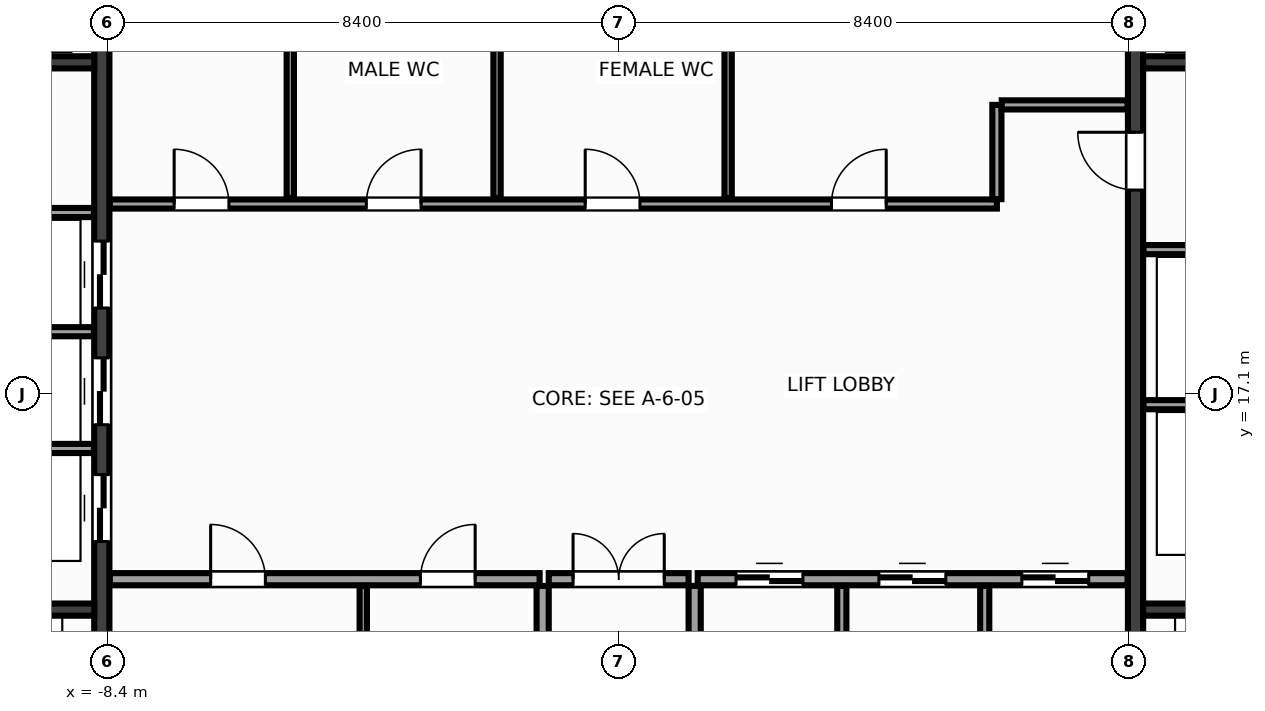
"""IFC4 building model, lengths in metres.
Left out: names, types, materials, properties, quantities, classifications, styles, units other than length and angle.
Written with IfcOpenShell. Run it as: python <this file> out.ifc"""

import sys

from ifc_helpers import new_model, si_unit, direction, frame, frame_2d, origin, place, context, subcontext, project, spatial, rectangle, extrude, source, transform, mapped, element, fill, save


model = new_model("IFC4")
c1 = context("Model", 3, precision=1e-05, world=origin(), true_north=direction((0.0, 1.0)))
c2 = subcontext(c1, "Body", "Model", "MODEL_VIEW")
j1 = project(units=[si_unit("LENGTHUNIT", "METRE"), si_unit("PLANEANGLEUNIT", "RADIAN")], contexts=[c1])
p1 = place(None, origin())
s1 = spatial("IfcSite", under=j1, at=p1, CompositionType="ELEMENT")
p2 = place(p1, origin())
s2 = spatial("IfcBuilding", under=s1, at=p2, CompositionType="ELEMENT")
p3 = place(p2, frame((0.0, 0.0, 164.0)))
s3 = spatial("IfcBuildingStorey", under=s2, at=p3, CompositionType="ELEMENT", Elevation=164.0)
m1 = source(origin(), c2, "Body", "SweptSolid", [
    extrude(rectangle(XDim=12.95, YDim=0.25, at=frame_2d((6.475, 0.0))), origin(), (0.0, 0.0, 1.0), 3.6),
])
p4 = place(p3, frame((-8.5, 10.525, 0.0), z_axis=(0.0, 0.0, 1.0), x_axis=(0.0, 1.0, 0.0)))
e1 = element("IfcWall", 1, at=p4, inside=s3, PredefinedType="SHEAR", context=c2, shape_type="MappedRepresentation", body=[
    mapped(m1, transform((0.0, 0.0, 0.0), x_axis=(1.0, 0.0, 0.0), y_axis=(0.0, 1.0, 0.0), z_axis=(0.0, 0.0, 1.0), scale=1.0)),
])
p5 = place(p4, frame((4.145, 0.0, 0.0)))
e2 = element("IfcOpeningElement", 2, at=p5, cuts=e1, PredefinedType="OPENING", context=c2, shape_type="SweptSolid", body=[
    extrude(rectangle(XDim=1.1, YDim=2.15, at=frame_2d((0.55, 1.075))), frame((0.0, 0.137, 0.0), z_axis=(0.0, -1.0, 0.0), x_axis=(1.0, 0.0, 0.0)), (0.0, 0.0, 1.0), 0.274),
])
p6 = place(p4, frame((6.065, 0.0, 0.0)))
e3 = element("IfcOpeningElement", 3, at=p6, cuts=e1, PredefinedType="OPENING", context=c2, shape_type="SweptSolid", body=[
    extrude(rectangle(XDim=1.1, YDim=2.15, at=frame_2d((0.55, 1.075))), frame((0.0, 0.137, 0.0), z_axis=(0.0, -1.0, 0.0), x_axis=(1.0, 0.0, 0.0)), (0.0, 0.0, 1.0), 0.274),
])
p7 = place(p4, frame((7.985, 0.0, 0.0)))
e4 = element("IfcOpeningElement", 4, at=p7, cuts=e1, PredefinedType="OPENING", context=c2, shape_type="SweptSolid", body=[
    extrude(rectangle(XDim=1.1, YDim=2.15, at=frame_2d((0.55, 1.075))), frame((0.0, 0.137, 0.0), z_axis=(0.0, -1.0, 0.0), x_axis=(1.0, 0.0, 0.0)), (0.0, 0.0, 1.0), 0.274),
])
p8 = place(p3, frame((8.5, 10.525, 0.0), z_axis=(0.0, 0.0, 1.0), x_axis=(0.0, 1.0, 0.0)))
e5 = element("IfcWall", 5, at=p8, inside=s3, PredefinedType="SHEAR", context=c2, shape_type="MappedRepresentation", body=[
    mapped(m1, transform((0.0, 0.0, 0.0), x_axis=(1.0, 0.0, 0.0), y_axis=(0.0, 1.0, 0.0), z_axis=(0.0, 0.0, 1.0), scale=1.0)),
])
p9 = place(p8, frame((9.925, 0.0, 0.0)))
e6 = element("IfcOpeningElement", 6, at=p9, cuts=e5, PredefinedType="OPENING", context=c2, shape_type="SweptSolid", body=[
    extrude(rectangle(XDim=0.95, YDim=2.15, at=frame_2d((0.475, 1.075))), frame((0.0, 0.137, 0.0), z_axis=(0.0, -1.0, 0.0), x_axis=(1.0, 0.0, 0.0)), (0.0, 0.0, 1.0), 0.274),
])
m2 = source(origin(), c2, "Body", "SweptSolid", [
    extrude(rectangle(XDim=2.825, YDim=0.2, at=frame_2d((1.413, 0.0))), origin(), (0.0, 0.0, 1.0), 3.6),
])
for number, where, z_axis, x_axis in (
    (7, (-11.45, 13.55, 0.0), (0.0, 0.0, 1.0), (1.0, 0.0, 0.0)),
    (8, (8.625, 13.55, 0.0), (0.0, 0.0, 1.0), (1.0, 0.0, 0.0)),
):
    element("IfcWall", number, at=place(p3, frame(where, z_axis=z_axis, x_axis=x_axis)), inside=s3, PredefinedType="SHEAR", context=c2, shape_type="MappedRepresentation", body=[
        mapped(m2, transform((0.0, 0.0, 0.0), x_axis=(1.0, 0.0, 0.0), y_axis=(0.0, 1.0, 0.0), z_axis=(0.0, 0.0, 1.0), scale=1.0)),
    ])
m3 = source(origin(), c2, "Body", "SweptSolid", [
    extrude(rectangle(XDim=3.02, YDim=0.2, at=frame_2d((1.51, 0.0))), origin(), (0.0, 0.0, 1.0), 3.6),
])
for number, where, z_axis, x_axis in (
    (9, (-11.645, 22.55, 0.0), (0.0, 0.0, 1.0), (1.0, 0.0, 0.0)),
    (10, (8.625, 22.55, 0.0), (0.0, 0.0, 1.0), (1.0, 0.0, 0.0)),
):
    element("IfcWall", number, at=place(p3, frame(where, z_axis=z_axis, x_axis=x_axis)), inside=s3, PredefinedType="SHEAR", context=c2, shape_type="MappedRepresentation", body=[
        mapped(m3, transform((0.0, 0.0, 0.0), x_axis=(1.0, 0.0, 0.0), y_axis=(0.0, 1.0, 0.0), z_axis=(0.0, 0.0, 1.0), scale=1.0)),
    ])
m4 = source(origin(), c2, "Body", "SweptSolid", [
    extrude(rectangle(XDim=3.01, YDim=0.15, at=frame_2d((1.505, 0.0))), origin(), (0.0, 0.0, 1.0), 3.38),
])
for number, where, z_axis, x_axis in (
    (11, (-11.64, 16.2, 0.0), (0.0, 0.0, 1.0), (1.0, 0.0, 0.0)),
    (12, (-11.64, 18.12, 0.0), (0.0, 0.0, 1.0), (1.0, 0.0, 0.0)),
    (13, (-11.64, 20.08, 0.0), (0.0, 0.0, 1.0), (1.0, 0.0, 0.0)),
    (14, (8.63, 16.92, 0.0), (0.0, 0.0, 1.0), (1.0, 0.0, 0.0)),
    (15, (8.63, 19.47, 0.0), (0.0, 0.0, 1.0), (1.0, 0.0, 0.0)),
):
    element("IfcWall", number, at=place(p3, frame(where, z_axis=z_axis, x_axis=x_axis)), inside=s3, PredefinedType="PARTITIONING", context=c2, shape_type="MappedRepresentation", body=[
        mapped(m4, transform((0.0, 0.0, 0.0), x_axis=(1.0, 0.0, 0.0), y_axis=(0.0, 1.0, 0.0), z_axis=(0.0, 0.0, 1.0), scale=1.0)),
    ])
m5 = source(origin(), c2, "Body", "SweptSolid", [
    extrude(rectangle(XDim=7.07, YDim=0.2, at=frame_2d((3.535, 0.0))), origin(), (0.0, 0.0, 1.0), 3.38),
])
p10 = place(p3, frame((-8.37, 14.05, 0.0), z_axis=(0.0, 0.0, 1.0), x_axis=(1.0, 0.0, 0.0)))
e16 = element("IfcWall", 16, at=p10, inside=s3, PredefinedType="PARTITIONING", context=c2, shape_type="MappedRepresentation", body=[
    mapped(m5, transform((0.0, 0.0, 0.0), x_axis=(1.0, 0.0, 0.0), y_axis=(0.0, 1.0, 0.0), z_axis=(0.0, 0.0, 1.0), scale=1.0)),
])
p11 = place(p10, frame((1.66, 0.0, 0.0)))
e17 = element("IfcOpeningElement", 17, at=p11, cuts=e16, PredefinedType="OPENING", context=c2, shape_type="SweptSolid", body=[
    extrude(rectangle(XDim=0.9, YDim=2.15, at=frame_2d((0.45, 1.075))), frame((0.0, 0.112, 0.0), z_axis=(0.0, -1.0, 0.0), x_axis=(1.0, 0.0, 0.0)), (0.0, 0.0, 1.0), 0.224),
])
p12 = place(p10, frame((5.11, 0.0, 0.0)))
e18 = element("IfcOpeningElement", 18, at=p12, cuts=e16, PredefinedType="OPENING", context=c2, shape_type="SweptSolid", body=[
    extrude(rectangle(XDim=0.9, YDim=2.15, at=frame_2d((0.45, 1.075))), frame((0.0, 0.112, 0.0), z_axis=(0.0, -1.0, 0.0), x_axis=(1.0, 0.0, 0.0)), (0.0, 0.0, 1.0), 0.224),
])
p13 = place(p3, frame((1.3, 14.05, 0.0), z_axis=(0.0, 0.0, 1.0), x_axis=(1.0, 0.0, 0.0)))
e19 = element("IfcWall", 19, at=p13, inside=s3, PredefinedType="PARTITIONING", context=c2, shape_type="MappedRepresentation", body=[
    mapped(m5, transform((0.0, 0.0, 0.0), x_axis=(1.0, 0.0, 0.0), y_axis=(0.0, 1.0, 0.0), z_axis=(0.0, 0.0, 1.0), scale=1.0)),
])
p14 = place(p13, frame((0.63, 0.0, 0.0)))
e20 = element("IfcOpeningElement", 20, at=p14, cuts=e19, PredefinedType="OPENING", context=c2, shape_type="SweptSolid", body=[
    extrude(rectangle(XDim=1.1, YDim=2.15, at=frame_2d((0.55, 1.075))), frame((0.0, 0.112, 0.0), z_axis=(0.0, -1.0, 0.0), x_axis=(1.0, 0.0, 0.0)), (0.0, 0.0, 1.0), 0.224),
])
p15 = place(p13, frame((2.98, 0.0, 0.0)))
e21 = element("IfcOpeningElement", 21, at=p15, cuts=e19, PredefinedType="OPENING", context=c2, shape_type="SweptSolid", body=[
    extrude(rectangle(XDim=1.1, YDim=2.15, at=frame_2d((0.55, 1.075))), frame((0.0, 0.112, 0.0), z_axis=(0.0, -1.0, 0.0), x_axis=(1.0, 0.0, 0.0)), (0.0, 0.0, 1.0), 0.224),
])
p16 = place(p13, frame((5.33, 0.0, 0.0)))
e22 = element("IfcOpeningElement", 22, at=p16, cuts=e19, PredefinedType="OPENING", context=c2, shape_type="SweptSolid", body=[
    extrude(rectangle(XDim=1.1, YDim=2.15, at=frame_2d((0.55, 1.075))), frame((0.0, 0.112, 0.0), z_axis=(0.0, -1.0, 0.0), x_axis=(1.0, 0.0, 0.0)), (0.0, 0.0, 1.0), 0.224),
])
m6 = source(origin(), c2, "Body", "SweptSolid", [
    extrude(rectangle(XDim=3.415, YDim=0.2, at=frame_2d((1.708, 0.0))), origin(), (0.0, 0.0, 1.0), 3.38),
])
for number, where, z_axis, x_axis in (
    (23, (-1.25, 10.525, 0.0), (0.0, 0.0, 1.0), (0.0, 1.0, 0.0)),
    (24, (1.25, 10.525, 0.0), (0.0, 0.0, 1.0), (0.0, 1.0, 0.0)),
):
    element("IfcWall", number, at=place(p3, frame(where, z_axis=z_axis, x_axis=x_axis)), inside=s3, PredefinedType="PARTITIONING", context=c2, shape_type="MappedRepresentation", body=[
        mapped(m6, transform((0.0, 0.0, 0.0), x_axis=(1.0, 0.0, 0.0), y_axis=(0.0, 1.0, 0.0), z_axis=(0.0, 0.0, 1.0), scale=1.0)),
    ])
m7 = source(origin(), c2, "Body", "SweptSolid", [
    extrude(rectangle(XDim=2.3, YDim=0.2, at=frame_2d((1.15, 0.0))), origin(), (0.0, 0.0, 1.0), 3.38),
])
p17 = place(p3, frame((-1.15, 14.05, 0.0), z_axis=(0.0, 0.0, 1.0), x_axis=(1.0, 0.0, 0.0)))
e25 = element("IfcWall", 25, at=p17, inside=s3, PredefinedType="PARTITIONING", context=c2, shape_type="MappedRepresentation", body=[
    mapped(m7, transform((0.0, 0.0, 0.0), x_axis=(1.0, 0.0, 0.0), y_axis=(0.0, 1.0, 0.0), z_axis=(0.0, 0.0, 1.0), scale=1.0)),
])
p18 = place(p17, frame((0.4, 0.0, 0.0)))
e26 = element("IfcOpeningElement", 26, at=p18, cuts=e25, PredefinedType="OPENING", context=c2, shape_type="SweptSolid", body=[
    extrude(rectangle(XDim=1.5, YDim=2.2, at=frame_2d((0.75, 1.1))), frame((0.0, 0.112, 0.0), z_axis=(0.0, -1.0, 0.0), x_axis=(1.0, 0.0, 0.0)), (0.0, 0.0, 1.0), 0.224),
])
m8 = source(origin(), c2, "Body", "SweptSolid", [
    extrude(rectangle(XDim=14.59, YDim=0.15, at=frame_2d((7.295, 0.0))), origin(), (0.0, 0.0, 1.0), 3.38),
])
p19 = place(p3, frame((-8.37, 20.22, 0.0), z_axis=(0.0, 0.0, 1.0), x_axis=(1.0, 0.0, 0.0)))
e27 = element("IfcWall", 27, at=p19, inside=s3, PredefinedType="PARTITIONING", context=c2, shape_type="MappedRepresentation", body=[
    mapped(m8, transform((0.0, 0.0, 0.0), x_axis=(1.0, 0.0, 0.0), y_axis=(0.0, 1.0, 0.0), z_axis=(0.0, 0.0, 1.0), scale=1.0)),
])
p20 = place(p19, frame((1.06, 0.0, 0.0)))
e28 = element("IfcOpeningElement", 28, at=p20, cuts=e27, PredefinedType="OPENING", context=c2, shape_type="SweptSolid", body=[
    extrude(rectangle(XDim=0.9, YDim=2.15, at=frame_2d((0.45, 1.075))), frame((0.0, 0.087, 0.0), z_axis=(0.0, -1.0, 0.0), x_axis=(1.0, 0.0, 0.0)), (0.0, 0.0, 1.0), 0.174),
])
p21 = place(p19, frame((4.22, 0.0, 0.0)))
e29 = element("IfcOpeningElement", 29, at=p21, cuts=e27, PredefinedType="OPENING", context=c2, shape_type="SweptSolid", body=[
    extrude(rectangle(XDim=0.9, YDim=2.15, at=frame_2d((0.45, 1.075))), frame((0.0, 0.087, 0.0), z_axis=(0.0, -1.0, 0.0), x_axis=(1.0, 0.0, 0.0)), (0.0, 0.0, 1.0), 0.174),
])
p22 = place(p19, frame((7.82, 0.0, 0.0)))
e30 = element("IfcOpeningElement", 30, at=p22, cuts=e27, PredefinedType="OPENING", context=c2, shape_type="SweptSolid", body=[
    extrude(rectangle(XDim=0.9, YDim=2.15, at=frame_2d((0.45, 1.075))), frame((0.0, 0.087, 0.0), z_axis=(0.0, -1.0, 0.0), x_axis=(1.0, 0.0, 0.0)), (0.0, 0.0, 1.0), 0.174),
])
p23 = place(p19, frame((11.87, 0.0, 0.0)))
e31 = element("IfcOpeningElement", 31, at=p23, cuts=e27, PredefinedType="OPENING", context=c2, shape_type="SweptSolid", body=[
    extrude(rectangle(XDim=0.9, YDim=2.15, at=frame_2d((0.45, 1.075))), frame((0.0, 0.087, 0.0), z_axis=(0.0, -1.0, 0.0), x_axis=(1.0, 0.0, 0.0)), (0.0, 0.0, 1.0), 0.174),
])
m9 = source(origin(), c2, "Body", "SweptSolid", [
    extrude(rectangle(XDim=1.55, YDim=0.15, at=frame_2d((0.775, 0.0))), origin(), (0.0, 0.0, 1.0), 3.38),
])
p24 = place(p3, frame((6.22, 20.3, 0.0), z_axis=(0.0, 0.0, 1.0), x_axis=(0.0, 1.0, 0.0)))
e32 = element("IfcWall", 32, at=p24, inside=s3, PredefinedType="PARTITIONING", context=c2, shape_type="MappedRepresentation", body=[
    mapped(m9, transform((0.0, 0.0, 0.0), x_axis=(1.0, 0.0, 0.0), y_axis=(0.0, 1.0, 0.0), z_axis=(0.0, 0.0, 1.0), scale=1.0)),
])
m10 = source(origin(), c2, "Body", "SweptSolid", [
    extrude(rectangle(XDim=2.07, YDim=0.15, at=frame_2d((1.035, 0.0))), origin(), (0.0, 0.0, 1.0), 3.38),
])
p25 = place(p3, frame((6.3, 21.85, 0.0), z_axis=(0.0, 0.0, 1.0), x_axis=(1.0, 0.0, 0.0)))
e33 = element("IfcWall", 33, at=p25, inside=s3, PredefinedType="PARTITIONING", context=c2, shape_type="MappedRepresentation", body=[
    mapped(m10, transform((0.0, 0.0, 0.0), x_axis=(1.0, 0.0, 0.0), y_axis=(0.0, 1.0, 0.0), z_axis=(0.0, 0.0, 1.0), scale=1.0)),
])
m11 = source(origin(), c2, "Body", "SweptSolid", [
    extrude(rectangle(XDim=3.415, YDim=0.12, at=frame_2d((1.708, 0.0))), origin(), (0.0, 0.0, 1.0), 3.38),
])
p26 = place(p3, frame((-4.2, 10.525, 0.0), z_axis=(0.0, 0.0, 1.0), x_axis=(0.0, 1.0, 0.0)))
e34 = element("IfcWall", 34, at=p26, inside=s3, PredefinedType="PARTITIONING", context=c2, shape_type="MappedRepresentation", body=[
    mapped(m11, transform((0.0, 0.0, 0.0), x_axis=(1.0, 0.0, 0.0), y_axis=(0.0, 1.0, 0.0), z_axis=(0.0, 0.0, 1.0), scale=1.0)),
])
m12 = source(origin(), c2, "Body", "SweptSolid", [
    extrude(rectangle(XDim=3.415, YDim=0.15, at=frame_2d((1.708, 0.0))), origin(), (0.0, 0.0, 1.0), 3.38),
])
for number, where, z_axis, x_axis in (
    (35, (3.67, 10.525, 0.0), (0.0, 0.0, 1.0), (0.0, 1.0, 0.0)),
    (36, (6.02, 10.525, 0.0), (0.0, 0.0, 1.0), (0.0, 1.0, 0.0)),
):
    element("IfcWall", number, at=place(p3, frame(where, z_axis=z_axis, x_axis=x_axis)), inside=s3, PredefinedType="PARTITIONING", context=c2, shape_type="MappedRepresentation", body=[
        mapped(m12, transform((0.0, 0.0, 0.0), x_axis=(1.0, 0.0, 0.0), y_axis=(0.0, 1.0, 0.0), z_axis=(0.0, 0.0, 1.0), scale=1.0)),
    ])
m13 = source(origin(), c2, "Body", "SweptSolid", [
    extrude(rectangle(XDim=3.115, YDim=0.12, at=frame_2d((1.558, 0.0))), origin(), (0.0, 0.0, 1.0), 3.38),
])
for number, where, z_axis, x_axis in (
    (37, (-5.4, 20.32, 0.0), (0.0, 0.0, 1.0), (0.0, 1.0, 0.0)),
    (38, (-2.0, 20.32, 0.0), (0.0, 0.0, 1.0), (0.0, 1.0, 0.0)),
    (39, (1.8, 20.32, 0.0), (0.0, 0.0, 1.0), (0.0, 1.0, 0.0)),
):
    element("IfcWall", number, at=place(p3, frame(where, z_axis=z_axis, x_axis=x_axis)), inside=s3, PredefinedType="PARTITIONING", context=c2, shape_type="MappedRepresentation", body=[
        mapped(m13, transform((0.0, 0.0, 0.0), x_axis=(1.0, 0.0, 0.0), y_axis=(0.0, 1.0, 0.0), z_axis=(0.0, 0.0, 1.0), scale=1.0)),
    ])
m14 = source(origin(), c2, "Body", "SweptSolid", [
    extrude(rectangle(XDim=1.1, YDim=2.15, at=frame_2d((0.55, 1.075))), frame((0.0, 0.025, 0.0), z_axis=(0.0, -1.0, 0.0), x_axis=(1.0, 0.0, 0.0)), (0.0, 0.0, 1.0), 0.05),
])
p27 = place(p5, origin())
e40 = element("IfcDoor", 40, at=p27, inside=s3, OperationType="DOUBLE_DOOR_SLIDING", PredefinedType="DOOR", context=c2, shape_type="MappedRepresentation", body=[
    mapped(m14, transform((0.0, 0.0, 0.0), x_axis=(1.0, 0.0, 0.0), y_axis=(0.0, 1.0, 0.0), z_axis=(0.0, 0.0, 1.0), scale=1.0)),
])
fill(e2, e40)
p28 = place(p6, origin())
e41 = element("IfcDoor", 41, at=p28, inside=s3, OperationType="DOUBLE_DOOR_SLIDING", PredefinedType="DOOR", context=c2, shape_type="MappedRepresentation", body=[
    mapped(m14, transform((0.0, 0.0, 0.0), x_axis=(1.0, 0.0, 0.0), y_axis=(0.0, 1.0, 0.0), z_axis=(0.0, 0.0, 1.0), scale=1.0)),
])
fill(e3, e41)
p29 = place(p7, origin())
e42 = element("IfcDoor", 42, at=p29, inside=s3, OperationType="DOUBLE_DOOR_SLIDING", PredefinedType="DOOR", context=c2, shape_type="MappedRepresentation", body=[
    mapped(m14, transform((0.0, 0.0, 0.0), x_axis=(1.0, 0.0, 0.0), y_axis=(0.0, 1.0, 0.0), z_axis=(0.0, 0.0, 1.0), scale=1.0)),
])
fill(e4, e42)
m15 = source(origin(), c2, "Body", "SweptSolid", [
    extrude(rectangle(XDim=0.95, YDim=2.15, at=frame_2d((0.475, 1.075))), frame((0.0, 0.025, 0.0), z_axis=(0.0, -1.0, 0.0), x_axis=(1.0, 0.0, 0.0)), (0.0, 0.0, 1.0), 0.05),
])
p30 = place(p9, origin())
e43 = element("IfcDoor", 43, at=p30, inside=s3, OperationType="SINGLE_SWING_RIGHT", PredefinedType="DOOR", context=c2, shape_type="MappedRepresentation", body=[
    mapped(m15, transform((0.0, 0.0, 0.0), x_axis=(1.0, 0.0, 0.0), y_axis=(0.0, 1.0, 0.0), z_axis=(0.0, 0.0, 1.0), scale=1.0)),
])
fill(e6, e43)
m16 = source(origin(), c2, "Body", "SweptSolid", [
    extrude(rectangle(XDim=0.9, YDim=2.15, at=frame_2d((0.45, 1.075))), frame((0.0, 0.025, 0.0), z_axis=(0.0, -1.0, 0.0), x_axis=(1.0, 0.0, 0.0)), (0.0, 0.0, 1.0), 0.05),
])
p31 = place(p11, origin())
e44 = element("IfcDoor", 44, at=p31, inside=s3, OperationType="SINGLE_SWING_LEFT", PredefinedType="DOOR", context=c2, shape_type="MappedRepresentation", body=[
    mapped(m16, transform((0.0, 0.0, 0.0), x_axis=(1.0, 0.0, 0.0), y_axis=(0.0, 1.0, 0.0), z_axis=(0.0, 0.0, 1.0), scale=1.0)),
])
fill(e17, e44)
p32 = place(p12, origin())
e45 = element("IfcDoor", 45, at=p32, inside=s3, OperationType="SINGLE_SWING_RIGHT", PredefinedType="DOOR", context=c2, shape_type="MappedRepresentation", body=[
    mapped(m16, transform((0.0, 0.0, 0.0), x_axis=(1.0, 0.0, 0.0), y_axis=(0.0, 1.0, 0.0), z_axis=(0.0, 0.0, 1.0), scale=1.0)),
])
fill(e18, e45)
p33 = place(p14, origin())
e46 = element("IfcDoor", 46, at=p33, inside=s3, OperationType="DOUBLE_DOOR_SLIDING", PredefinedType="DOOR", context=c2, shape_type="MappedRepresentation", body=[
    mapped(m14, transform((0.0, 0.0, 0.0), x_axis=(1.0, 0.0, 0.0), y_axis=(0.0, 1.0, 0.0), z_axis=(0.0, 0.0, 1.0), scale=1.0)),
])
fill(e20, e46)
p34 = place(p15, origin())
e47 = element("IfcDoor", 47, at=p34, inside=s3, OperationType="DOUBLE_DOOR_SLIDING", PredefinedType="DOOR", context=c2, shape_type="MappedRepresentation", body=[
    mapped(m14, transform((0.0, 0.0, 0.0), x_axis=(1.0, 0.0, 0.0), y_axis=(0.0, 1.0, 0.0), z_axis=(0.0, 0.0, 1.0), scale=1.0)),
])
fill(e21, e47)
p35 = place(p16, origin())
e48 = element("IfcDoor", 48, at=p35, inside=s3, OperationType="DOUBLE_DOOR_SLIDING", PredefinedType="DOOR", context=c2, shape_type="MappedRepresentation", body=[
    mapped(m14, transform((0.0, 0.0, 0.0), x_axis=(1.0, 0.0, 0.0), y_axis=(0.0, 1.0, 0.0), z_axis=(0.0, 0.0, 1.0), scale=1.0)),
])
fill(e22, e48)
m17 = source(origin(), c2, "Body", "SweptSolid", [
    extrude(rectangle(XDim=1.5, YDim=2.2, at=frame_2d((0.75, 1.1))), frame((0.0, 0.025, 0.0), z_axis=(0.0, -1.0, 0.0), x_axis=(1.0, 0.0, 0.0)), (0.0, 0.0, 1.0), 0.05),
])
p36 = place(p18, origin())
e49 = element("IfcDoor", 49, at=p36, inside=s3, OperationType="DOUBLE_DOOR_SINGLE_SWING", PredefinedType="DOOR", context=c2, shape_type="MappedRepresentation", body=[
    mapped(m17, transform((0.0, 0.0, 0.0), x_axis=(1.0, 0.0, 0.0), y_axis=(0.0, 1.0, 0.0), z_axis=(0.0, 0.0, 1.0), scale=1.0)),
])
fill(e26, e49)
p37 = place(p20, origin())
e50 = element("IfcDoor", 50, at=p37, inside=s3, OperationType="SINGLE_SWING_LEFT", PredefinedType="DOOR", context=c2, shape_type="MappedRepresentation", body=[
    mapped(m16, transform((0.0, 0.0, 0.0), x_axis=(1.0, 0.0, 0.0), y_axis=(0.0, 1.0, 0.0), z_axis=(0.0, 0.0, 1.0), scale=1.0)),
])
fill(e28, e50)
p38 = place(p21, origin())
e51 = element("IfcDoor", 51, at=p38, inside=s3, OperationType="SINGLE_SWING_RIGHT", PredefinedType="DOOR", context=c2, shape_type="MappedRepresentation", body=[
    mapped(m16, transform((0.0, 0.0, 0.0), x_axis=(1.0, 0.0, 0.0), y_axis=(0.0, 1.0, 0.0), z_axis=(0.0, 0.0, 1.0), scale=1.0)),
])
fill(e29, e51)
p39 = place(p22, origin())
e52 = element("IfcDoor", 52, at=p39, inside=s3, OperationType="SINGLE_SWING_LEFT", PredefinedType="DOOR", context=c2, shape_type="MappedRepresentation", body=[
    mapped(m16, transform((0.0, 0.0, 0.0), x_axis=(1.0, 0.0, 0.0), y_axis=(0.0, 1.0, 0.0), z_axis=(0.0, 0.0, 1.0), scale=1.0)),
])
fill(e30, e52)
p40 = place(p23, origin())
e53 = element("IfcDoor", 53, at=p40, inside=s3, OperationType="SINGLE_SWING_RIGHT", PredefinedType="DOOR", context=c2, shape_type="MappedRepresentation", body=[
    mapped(m16, transform((0.0, 0.0, 0.0), x_axis=(1.0, 0.0, 0.0), y_axis=(0.0, 1.0, 0.0), z_axis=(0.0, 0.0, 1.0), scale=1.0)),
])
fill(e31, e53)
save(model, sys.argv[1])
